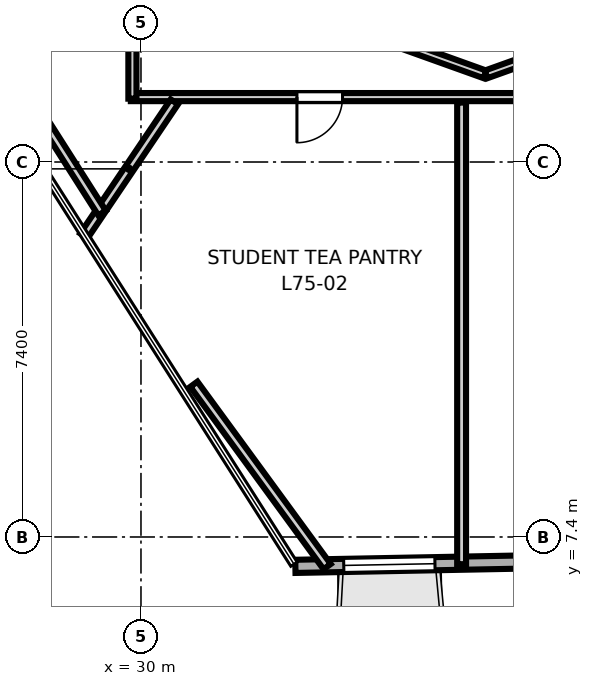
"""IFC4 building model, lengths in metres.
Left out: names, types, materials, properties, quantities, classifications, styles, units other than length and angle.
Written with IfcOpenShell. Run it as: python <this file> out.ifc"""

import sys

from ifc_helpers import new_model, si_unit, direction, frame, frame_2d, origin, place, context, subcontext, project, spatial, rectangle, extrude, element, fill, save


model = new_model("IFC4")
c1 = context("Model", 3, precision=1e-05, world=origin(), true_north=direction((0.0, 1.0)))
c2 = subcontext(c1, "Body", "Model", "MODEL_VIEW")
j1 = project(units=[si_unit("LENGTHUNIT", "METRE"), si_unit("PLANEANGLEUNIT", "RADIAN")], contexts=[c1])
p1 = place(None, origin())
s1 = spatial("IfcSite", under=j1, at=p1, CompositionType="ELEMENT")
p2 = place(p1, origin())
s2 = spatial("IfcBuilding", under=s1, at=p2, CompositionType="ELEMENT")
p3 = place(p2, frame((0.0, 0.0, 291.7)))
s3 = spatial("IfcBuildingStorey", under=s2, at=p3, CompositionType="ELEMENT", Elevation=291.7)
p4 = place(p3, frame((33.047, 6.82, 0.0), z_axis=(0.0, 0.0, 1.0), x_axis=(0.999816998349, 0.019130337478, 0.0)))
e1 = element("IfcWall", 1, at=p4, inside=s3, PredefinedType="SOLIDWALL", context=c2, shape_type="SweptSolid", body=[
    extrude(rectangle(XDim=4.99, YDim=0.26, at=frame_2d((2.495, 0.0))), origin(), (0.0, 0.0, 1.0), 3.52),
])
p5 = place(p4, frame((0.955, 0.0, 0.85)))
e2 = element("IfcOpeningElement", 2, at=p5, cuts=e1, PredefinedType="OPENING", context=c2, shape_type="SweptSolid", body=[
    extrude(rectangle(XDim=1.8, YDim=2.1, at=frame_2d((0.9, 1.05))), frame((0.0, 0.14, 0.0), z_axis=(0.0, -1.0, 0.0), x_axis=(1.0, 0.0, 0.0)), (0.0, 0.0, 1.0), 0.28),
])
p6 = place(p3, frame((33.458, 17.724, 0.0), z_axis=(0.0, 0.0, 1.0), x_axis=(0.94128854789, -0.337603124408, 0.0)))
e3 = element("IfcWall", 3, at=p6, inside=s3, PredefinedType="PARTITIONING", context=c2, shape_type="SweptSolid", body=[
    extrude(rectangle(XDim=3.54, YDim=0.16, at=frame_2d((1.77, 0.0))), origin(), (0.0, 0.0, 1.0), 2.84),
])
p7 = place(p3, frame((36.81, 16.529, 0.0), z_axis=(0.0, 0.0, 1.0), x_axis=(0.941548344365, 0.33687789364, 0.0)))
e4 = element("IfcWall", 4, at=p7, inside=s3, PredefinedType="PARTITIONING", context=c2, shape_type="SweptSolid", body=[
    extrude(rectangle(XDim=3.513, YDim=0.16, at=frame_2d((1.756, 0.0))), origin(), (0.0, 0.0, 1.0), 2.84),
])
p8 = place(p3, frame((44.046, 16.081, 0.0), z_axis=(0.0, 0.0, 1.0), x_axis=(-1.0, 0.0, 0.0)))
e5 = element("IfcWall", 5, at=p8, inside=s3, PredefinedType="PARTITIONING", context=c2, shape_type="SweptSolid", body=[
    extrude(rectangle(XDim=14.246, YDim=0.16, at=frame_2d((7.123, 0.0))), origin(), (0.0, 0.0, 1.0), 2.84),
])
p9 = place(p8, frame((10.069, 0.0, 0.0)))
e6 = element("IfcOpeningElement", 6, at=p9, cuts=e5, PredefinedType="OPENING", context=c2, shape_type="SweptSolid", body=[
    extrude(rectangle(XDim=0.9, YDim=2.1, at=frame_2d((0.45, 1.05))), frame((0.0, 0.09, 0.0), z_axis=(0.0, -1.0, 0.0), x_axis=(1.0, 0.0, 0.0)), (0.0, 0.0, 1.0), 0.18),
])
p10 = place(p3, frame((29.831, 16.05, 0.0), z_axis=(0.0, 0.0, 1.0), x_axis=(0.0, 1.0, 0.0)))
e7 = element("IfcWall", 7, at=p10, inside=s3, PredefinedType="PARTITIONING", context=c2, shape_type="SweptSolid", body=[
    extrude(rectangle(XDim=3.35, YDim=0.16, at=frame_2d((1.675, 0.0))), origin(), (0.0, 0.0, 1.0), 2.84),
])
p11 = place(p3, frame((30.658, 15.987, 0.0), z_axis=(0.0, 0.0, 1.0), x_axis=(-0.559194255482, -0.82903666061, 0.0)))
e8 = element("IfcWall", 8, at=p11, inside=s3, PredefinedType="PLUMBINGWALL", context=c2, shape_type="SweptSolid", body=[
    extrude(rectangle(XDim=3.191, YDim=0.175, at=frame_2d((1.596, 0.0))), origin(), (0.0, 0.0, 1.0), 2.84),
])
p12 = place(p3, frame((29.231, 13.794, 0.0), z_axis=(0.0, 0.0, 1.0), x_axis=(-0.5370149386, 0.843572732916, 0.0)))
e9 = element("IfcWall", 9, at=p12, inside=s3, PredefinedType="PLUMBINGWALL", context=c2, shape_type="SweptSolid", body=[
    extrude(rectangle(XDim=6.57, YDim=0.175, at=frame_2d((3.285, 0.0))), origin(), (0.0, 0.0, 1.0), 2.84),
])
p13 = place(p3, frame((36.328, 15.973, 0.0), z_axis=(0.0, 0.0, 1.0), x_axis=(0.0, -1.0, 0.0)))
e10 = element("IfcWall", 10, at=p13, inside=s3, PredefinedType="PLUMBINGWALL", context=c2, shape_type="SweptSolid", body=[
    extrude(rectangle(XDim=9.11, YDim=0.175, at=frame_2d((4.555, 0.0))), origin(), (0.0, 0.0, 1.0), 2.84),
])
p14 = place(p3, frame((33.674, 6.815, 0.0), z_axis=(0.0, 0.0, 1.0), x_axis=(-0.589990500087, 0.807410186836, 0.0)))
e11 = element("IfcWall", 11, at=p14, inside=s3, PredefinedType="PLUMBINGWALL", context=c2, shape_type="SweptSolid", body=[
    extrude(rectangle(XDim=4.458, YDim=0.175, at=frame_2d((2.229, 0.0))), origin(), (0.0, 0.0, 1.0), 2.84),
])
p15 = place(p9, origin())
e12 = element("IfcDoor", 12, at=p15, inside=s3, OperationType="SINGLE_SWING_RIGHT", PredefinedType="DOOR", context=c2, shape_type="SweptSolid", body=[
    extrude(rectangle(XDim=0.9, YDim=2.1, at=frame_2d((0.45, 1.05))), frame((0.0, 0.025, 0.0), z_axis=(0.0, -1.0, 0.0), x_axis=(1.0, 0.0, 0.0)), (0.0, 0.0, 1.0), 0.05),
])
fill(e6, e12)
p16 = place(p5, origin())
e13 = element("IfcWindow", 13, at=p16, inside=s3, PartitioningType="SINGLE_PANEL", PredefinedType="WINDOW", context=c2, shape_type="SweptSolid", body=[
    extrude(rectangle(XDim=1.8, YDim=2.1, at=frame_2d((0.9, 1.05))), frame((0.0, 0.03, 0.0), z_axis=(0.0, -1.0, 0.0), x_axis=(1.0, 0.0, 0.0)), (0.0, 0.0, 1.0), 0.06),
])
fill(e2, e13)
save(model, sys.argv[1])
